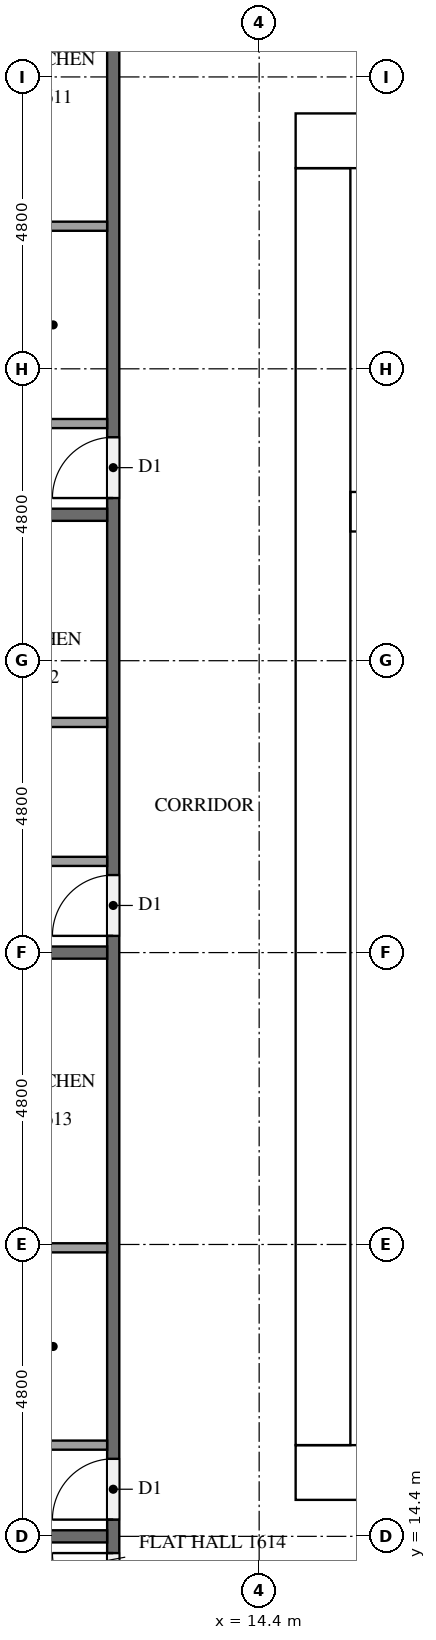
"""IFC4 building model, lengths in metres.
Left out: names, types, materials, properties, quantities, classifications, styles, units other than length and angle.
Written with IfcOpenShell. Run it as: python <this file> out.ifc"""

import sys

from ifc_helpers import new_model, si_unit, direction, frame, frame_2d, origin, place, context, subcontext, project, spatial, rectangle, extrude, element, fill, save


model = new_model("IFC4")
c1 = context("Model", 3, precision=1e-05, world=origin(), true_north=direction((0.0, 1.0)))
c2 = subcontext(c1, "Body", "Model", "MODEL_VIEW")
j1 = project(units=[si_unit("LENGTHUNIT", "METRE"), si_unit("PLANEANGLEUNIT", "RADIAN")], contexts=[c1])
p1 = place(None, origin())
s1 = spatial("IfcSite", under=j1, at=p1, CompositionType="ELEMENT")
p2 = place(p1, origin())
s2 = spatial("IfcBuilding", under=s1, at=p2, CompositionType="ELEMENT")
p3 = place(p2, frame((0.0, 0.0, 66.3)))
s3 = spatial("IfcBuildingStorey", under=s2, at=p3, CompositionType="ELEMENT", Elevation=66.3)
p4 = place(p3, frame((15.0, 15.45, 0.0), z_axis=(0.0, 0.0, 1.0), x_axis=(1.0, 0.0, 0.0)))
e1 = element("IfcWall", 1, at=p4, inside=s3, PredefinedType="SHEAR", context=c2, shape_type="SweptSolid", body=[
    extrude(rectangle(XDim=32.4, YDim=0.9, at=frame_2d((16.2, 0.0))), origin(), (0.0, 0.0, 1.0), 3.2),
])
p5 = place(p4, frame((15.3, 0.0, 0.0)))
e2 = element("IfcOpeningElement", 2, at=p5, cuts=e1, PredefinedType="OPENING", context=c2, shape_type="SweptSolid", body=[
    extrude(rectangle(XDim=1.8, YDim=2.1, at=frame_2d((0.9, 1.05))), frame((0.0, 0.46, 0.0), z_axis=(0.0, -1.0, 0.0), x_axis=(1.0, 0.0, 0.0)), (0.0, 0.0, 1.0), 0.92),
])
p6 = place(p3, frame((15.0, 37.35, 0.0), z_axis=(0.0, 0.0, 1.0), x_axis=(1.0, 0.0, 0.0)))
e3 = element("IfcWall", 3, at=p6, inside=s3, PredefinedType="SHEAR", context=c2, shape_type="SweptSolid", body=[
    extrude(rectangle(XDim=32.4, YDim=0.9, at=frame_2d((16.2, 0.0))), origin(), (0.0, 0.0, 1.0), 3.2),
])
p7 = place(p6, frame((15.3, 0.0, 0.0)))
e4 = element("IfcOpeningElement", 4, at=p7, cuts=e3, PredefinedType="OPENING", context=c2, shape_type="SweptSolid", body=[
    extrude(rectangle(XDim=1.8, YDim=2.1, at=frame_2d((0.9, 1.05))), frame((0.0, 0.46, 0.0), z_axis=(0.0, -1.0, 0.0), x_axis=(1.0, 0.0, 0.0)), (0.0, 0.0, 1.0), 0.92),
])
p8 = place(p6, frame((1.794, 0.0, 0.0)))
e5 = element("IfcOpeningElement", 5, at=p8, cuts=e3, PredefinedType="OPENING", context=c2, shape_type="SweptSolid", body=[
    extrude(rectangle(XDim=1.0, YDim=2.1, at=frame_2d((0.5, 1.05))), frame((0.0, 0.46, 0.0), z_axis=(0.0, -1.0, 0.0), x_axis=(1.0, 0.0, 0.0)), (0.0, 0.0, 1.0), 0.92),
])
p9 = place(p6, frame((5.331, 0.0, 0.0)))
e6 = element("IfcOpeningElement", 6, at=p9, cuts=e3, PredefinedType="OPENING", context=c2, shape_type="SweptSolid", body=[
    extrude(rectangle(XDim=1.0, YDim=2.1, at=frame_2d((0.5, 1.05))), frame((0.0, 0.46, 0.0), z_axis=(0.0, -1.0, 0.0), x_axis=(1.0, 0.0, 0.0)), (0.0, 0.0, 1.0), 0.92),
])
p10 = place(p3, frame((15.45, 15.9, 0.0), z_axis=(0.0, 0.0, 1.0), x_axis=(0.0, 1.0, 0.0)))
e7 = element("IfcWall", 7, at=p10, inside=s3, PredefinedType="SHEAR", context=c2, shape_type="SweptSolid", body=[
    extrude(rectangle(XDim=21.0, YDim=0.9, at=frame_2d((10.5, 0.0))), origin(), (0.0, 0.0, 1.0), 3.2),
])
p11 = place(p10, frame((4.86, 0.0, 0.0)))
e8 = element("IfcOpeningElement", 8, at=p11, cuts=e7, PredefinedType="OPENING", context=c2, shape_type="SweptSolid", body=[
    extrude(rectangle(XDim=1.2, YDim=2.1, at=frame_2d((0.6, 1.05))), frame((0.0, 0.46, 0.0), z_axis=(0.0, -1.0, 0.0), x_axis=(1.0, 0.0, 0.0)), (0.0, 0.0, 1.0), 0.92),
])
p12 = place(p3, frame((15.9, 31.25, 0.0), z_axis=(0.0, 0.0, 1.0), x_axis=(1.0, 0.0, 0.0)))
e9 = element("IfcWall", 9, at=p12, inside=s3, PredefinedType="SHEAR", context=c2, shape_type="SweptSolid", body=[
    extrude(rectangle(XDim=6.875, YDim=0.65, at=frame_2d((3.438, 0.0))), origin(), (0.0, 0.0, 1.0), 3.2),
])
p13 = place(p3, frame((12.0, 12.1, 0.0), z_axis=(0.0, 0.0, 1.0), x_axis=(0.0, 1.0, 0.0)))
e10 = element("IfcWall", 10, at=p13, inside=s3, PredefinedType="PARTITIONING", context=c2, shape_type="SweptSolid", body=[
    extrude(rectangle(XDim=28.6, YDim=0.2, at=frame_2d((14.3, 0.0))), origin(), (0.0, 0.0, 1.0), 3.2),
])
p14 = place(p13, frame((19.375, 0.0, 0.0)))
e11 = element("IfcOpeningElement", 11, at=p14, cuts=e10, PredefinedType="OPENING", context=c2, shape_type="SweptSolid", body=[
    extrude(rectangle(XDim=1.0, YDim=2.1, at=frame_2d((0.5, 1.05))), frame((0.0, 0.11, 0.0), z_axis=(0.0, -1.0, 0.0), x_axis=(1.0, 0.0, 0.0)), (0.0, 0.0, 1.0), 0.22),
])
p15 = place(p13, frame((12.175, 0.0, 0.0)))
e12 = element("IfcOpeningElement", 12, at=p15, cuts=e10, PredefinedType="OPENING", context=c2, shape_type="SweptSolid", body=[
    extrude(rectangle(XDim=1.0, YDim=2.1, at=frame_2d((0.5, 1.05))), frame((0.0, 0.11, 0.0), z_axis=(0.0, -1.0, 0.0), x_axis=(1.0, 0.0, 0.0)), (0.0, 0.0, 1.0), 0.22),
])
p16 = place(p13, frame((2.575, 0.0, 0.0)))
e13 = element("IfcOpeningElement", 13, at=p16, cuts=e10, PredefinedType="OPENING", context=c2, shape_type="SweptSolid", body=[
    extrude(rectangle(XDim=1.0, YDim=2.1, at=frame_2d((0.5, 1.05))), frame((0.0, 0.11, 0.0), z_axis=(0.0, -1.0, 0.0), x_axis=(1.0, 0.0, 0.0)), (0.0, 0.0, 1.0), 0.22),
])
p17 = place(p13, frame((1.025, 0.0, 0.0)))
e14 = element("IfcOpeningElement", 14, at=p17, cuts=e10, PredefinedType="OPENING", context=c2, shape_type="SweptSolid", body=[
    extrude(rectangle(XDim=1.0, YDim=2.1, at=frame_2d((0.5, 1.05))), frame((0.0, 0.11, 0.0), z_axis=(0.0, -1.0, 0.0), x_axis=(1.0, 0.0, 0.0)), (0.0, 0.0, 1.0), 0.22),
])
p18 = place(p3, frame((4.9, 31.2, 0.0), z_axis=(0.0, 0.0, 1.0), x_axis=(1.0, 0.0, 0.0)))
e15 = element("IfcWall", 15, at=p18, inside=s3, PredefinedType="PARTITIONING", context=c2, shape_type="SweptSolid", body=[
    extrude(rectangle(XDim=7.0, YDim=0.2, at=frame_2d((3.5, 0.0))), origin(), (0.0, 0.0, 1.0), 3.2),
])
for number, where, z_axis, x_axis in (
    (16, (5.225, 24.0, 0.0), (0.0, 0.0, 1.0), (1.0, 0.0, 0.0)),
    (17, (5.225, 14.4, 0.0), (0.0, 0.0, 1.0), (1.0, 0.0, 0.0)),
):
    element("IfcWall", number, at=place(p3, frame(where, z_axis=z_axis, x_axis=x_axis)), inside=s3, PredefinedType="PARTITIONING", context=c2, shape_type="SweptSolid", body=[
        extrude(rectangle(XDim=6.675, YDim=0.2, at=frame_2d((3.337, 0.0))), origin(), (0.0, 0.0, 1.0), 3.2),
    ])
p19 = place(p3, frame((11.9, 35.945, 0.0), z_axis=(0.0, 0.0, 1.0), x_axis=(-1.0, 0.0, 0.0)))
e18 = element("IfcWall", 18, at=p19, inside=s3, PredefinedType="PARTITIONING", context=c2, shape_type="SweptSolid", body=[
    extrude(rectangle(XDim=1.775, YDim=0.15, at=frame_2d((0.887, 0.0))), origin(), (0.0, 0.0, 1.0), 3.2),
])
p20 = place(p3, frame((11.9, 32.7, 0.0), z_axis=(0.0, 0.0, 1.0), x_axis=(-1.0, 0.0, 0.0)))
e19 = element("IfcWall", 19, at=p20, inside=s3, PredefinedType="PARTITIONING", context=c2, shape_type="SweptSolid", body=[
    extrude(rectangle(XDim=1.925, YDim=0.15, at=frame_2d((0.962, 0.0))), origin(), (0.0, 0.0, 1.0), 3.2),
])
p21 = place(p3, frame((11.9, 27.785, 0.0), z_axis=(0.0, 0.0, 1.0), x_axis=(-1.0, 0.0, 0.0)))
e20 = element("IfcWall", 20, at=p21, inside=s3, PredefinedType="PARTITIONING", context=c2, shape_type="SweptSolid", body=[
    extrude(rectangle(XDim=2.075, YDim=0.15, at=frame_2d((1.038, 0.0))), origin(), (0.0, 0.0, 1.0), 3.2),
])
p22 = place(p3, frame((11.9, 25.5, 0.0), z_axis=(0.0, 0.0, 1.0), x_axis=(-1.0, 0.0, 0.0)))
e21 = element("IfcWall", 21, at=p22, inside=s3, PredefinedType="PARTITIONING", context=c2, shape_type="SweptSolid", body=[
    extrude(rectangle(XDim=2.225, YDim=0.15, at=frame_2d((1.112, 0.0))), origin(), (0.0, 0.0, 1.0), 3.2),
])
p23 = place(p3, frame((11.9, 19.145, 0.0), z_axis=(0.0, 0.0, 1.0), x_axis=(-1.0, 0.0, 0.0)))
e22 = element("IfcWall", 22, at=p23, inside=s3, PredefinedType="PARTITIONING", context=c2, shape_type="SweptSolid", body=[
    extrude(rectangle(XDim=1.775, YDim=0.15, at=frame_2d((0.887, 0.0))), origin(), (0.0, 0.0, 1.0), 3.2),
])
p24 = place(p3, frame((11.9, 15.9, 0.0), z_axis=(0.0, 0.0, 1.0), x_axis=(-1.0, 0.0, 0.0)))
e23 = element("IfcWall", 23, at=p24, inside=s3, PredefinedType="PARTITIONING", context=c2, shape_type="SweptSolid", body=[
    extrude(rectangle(XDim=1.925, YDim=0.15, at=frame_2d((0.962, 0.0))), origin(), (0.0, 0.0, 1.0), 3.2),
])
p25 = place(p11, frame((1.2, 0.0, 0.0), z_axis=(0.0, 0.0, 1.0), x_axis=(-1.0, 0.0, 0.0)))
e24 = element("IfcDoor", 24, at=p25, inside=s3, OperationType="SINGLE_SWING_LEFT", PredefinedType="DOOR", context=c2, shape_type="SweptSolid", body=[
    extrude(rectangle(XDim=1.2, YDim=2.1, at=frame_2d((0.6, 1.05))), frame((0.0, 0.025, 0.0), z_axis=(0.0, -1.0, 0.0), x_axis=(1.0, 0.0, 0.0)), (0.0, 0.0, 1.0), 0.05),
])
fill(e8, e24)
p26 = place(p14, origin())
e25 = element("IfcDoor", 25, at=p26, inside=s3, OperationType="SINGLE_SWING_LEFT", PredefinedType="DOOR", context=c2, shape_type="SweptSolid", body=[
    extrude(rectangle(XDim=1.0, YDim=2.1, at=frame_2d((0.5, 1.05))), frame((0.0, 0.025, 0.0), z_axis=(0.0, -1.0, 0.0), x_axis=(1.0, 0.0, 0.0)), (0.0, 0.0, 1.0), 0.05),
])
fill(e11, e25)
p27 = place(p15, origin())
e26 = element("IfcDoor", 26, at=p27, inside=s3, OperationType="SINGLE_SWING_LEFT", PredefinedType="DOOR", context=c2, shape_type="SweptSolid", body=[
    extrude(rectangle(XDim=1.0, YDim=2.1, at=frame_2d((0.5, 1.05))), frame((0.0, 0.025, 0.0), z_axis=(0.0, -1.0, 0.0), x_axis=(1.0, 0.0, 0.0)), (0.0, 0.0, 1.0), 0.05),
])
fill(e12, e26)
p28 = place(p16, origin())
e27 = element("IfcDoor", 27, at=p28, inside=s3, OperationType="SINGLE_SWING_LEFT", PredefinedType="DOOR", context=c2, shape_type="SweptSolid", body=[
    extrude(rectangle(XDim=1.0, YDim=2.1, at=frame_2d((0.5, 1.05))), frame((0.0, 0.025, 0.0), z_axis=(0.0, -1.0, 0.0), x_axis=(1.0, 0.0, 0.0)), (0.0, 0.0, 1.0), 0.05),
])
fill(e13, e27)
p29 = place(p17, origin())
e28 = element("IfcDoor", 28, at=p29, inside=s3, OperationType="SINGLE_SWING_RIGHT", PredefinedType="DOOR", context=c2, shape_type="SweptSolid", body=[
    extrude(rectangle(XDim=1.0, YDim=2.1, at=frame_2d((0.5, 1.05))), frame((0.0, 0.025, 0.0), z_axis=(0.0, -1.0, 0.0), x_axis=(1.0, 0.0, 0.0)), (0.0, 0.0, 1.0), 0.05),
])
fill(e14, e28)
save(model, sys.argv[1])
